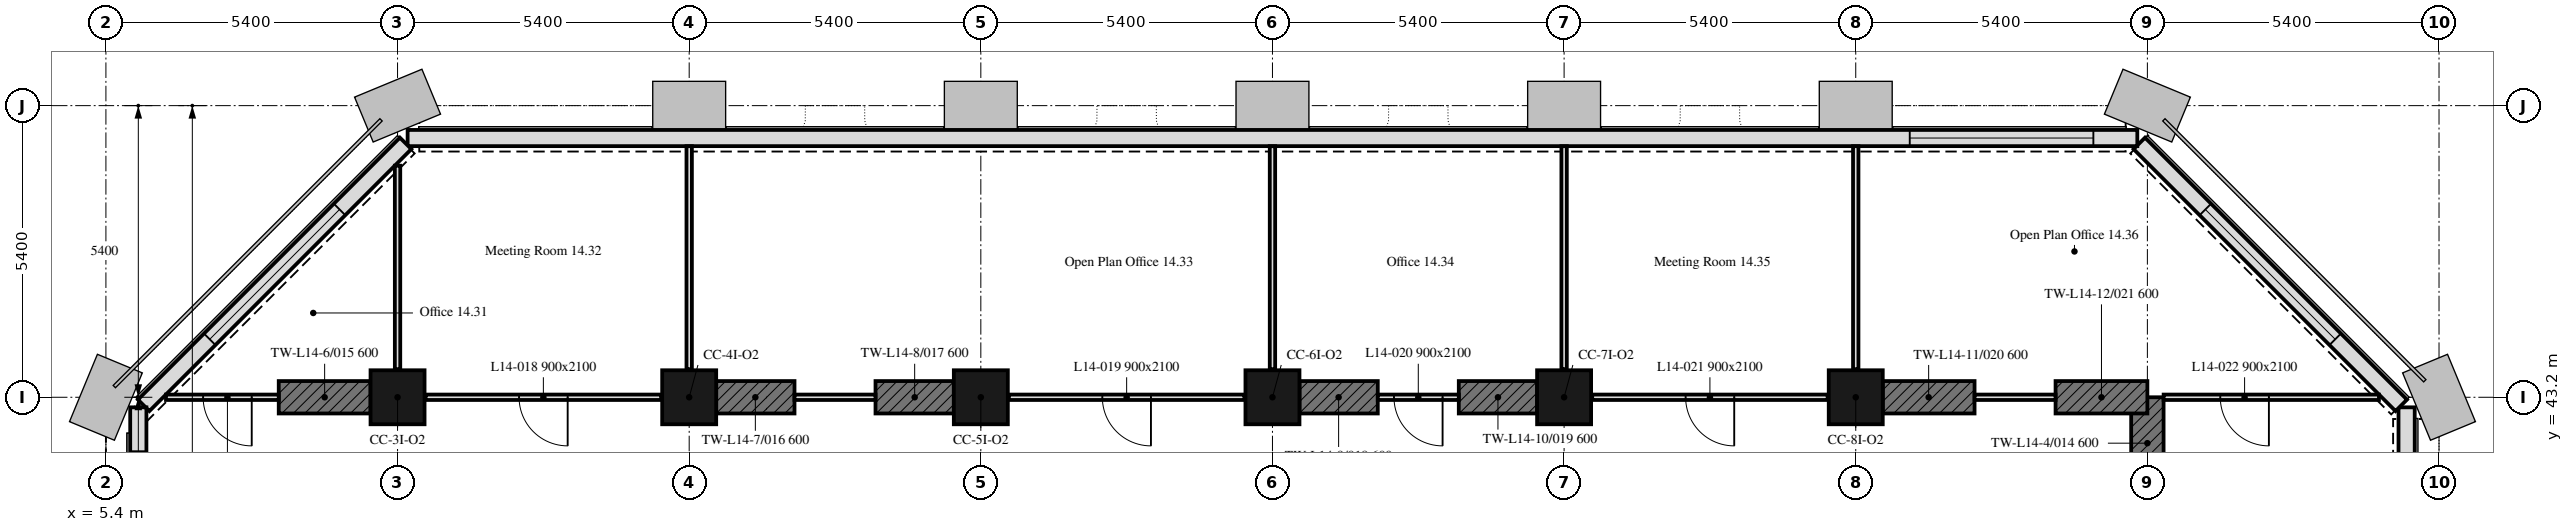
"""IFC4 building model, lengths in metres.
Left out: names, types, materials, properties, quantities, classifications, styles, units other than length and angle.
Written with IfcOpenShell. Run it as: python <this file> out.ifc"""

import sys

from ifc_helpers import new_model, si_unit, direction, frame, frame_2d, origin, origin_2d, place, context, subcontext, project, spatial, rectangle, extrude, element, fill, save


model = new_model("IFC4")
c1 = context("Model", 3, precision=1e-05, world=origin(), true_north=direction((0.0, 1.0)))
c2 = subcontext(c1, "Body", "Model", "MODEL_VIEW")
j1 = project(units=[si_unit("LENGTHUNIT", "METRE"), si_unit("PLANEANGLEUNIT", "RADIAN")], contexts=[c1])
p1 = place(None, origin())
s1 = spatial("IfcSite", under=j1, at=p1, CompositionType="ELEMENT")
p2 = place(p1, origin())
s2 = spatial("IfcBuilding", under=s1, at=p2, CompositionType="ELEMENT")
p3 = place(p2, frame((0.0, 0.0, 65.0)))
s3 = spatial("IfcBuildingStorey", under=s2, at=p3, CompositionType="ELEMENT", Elevation=65.0)
for number, where, z_axis, x_axis in (
    (1, (10.8, 43.2, 0.0), (0.0, 0.0, 1.0), (1.0, 0.0, 0.0)),
    (2, (16.2, 43.2, 0.0), (0.0, 0.0, 1.0), (1.0, 0.0, 0.0)),
    (3, (21.6, 43.2, 0.0), (0.0, 0.0, 1.0), (1.0, 0.0, 0.0)),
    (4, (27.0, 43.2, 0.0), (0.0, 0.0, 1.0), (1.0, 0.0, 0.0)),
    (5, (32.4, 43.2, 0.0), (0.0, 0.0, 1.0), (1.0, 0.0, 0.0)),
    (6, (37.8, 43.2, 0.0), (0.0, 0.0, 1.0), (1.0, 0.0, 0.0)),
):
    element("IfcColumn", number, at=place(p3, frame(where, z_axis=z_axis, x_axis=x_axis)), inside=s3, PredefinedType="COLUMN", context=c2, shape_type="SweptSolid", body=[
        extrude(rectangle(XDim=1.0, YDim=1.0, at=origin_2d()), origin(), (0.0, 0.0, 1.0), 3.5),
    ])
for number, where, z_axis, x_axis in (
    (7, (43.2, 41.5, 0.0), (0.0, 0.0, 1.0), (0.0, 1.0, 0.0)),
    (8, (8.6, 43.2, 0.0), (0.0, 0.0, 1.0), (1.0, 0.0, 0.0)),
):
    element("IfcWall", number, at=place(p3, frame(where, z_axis=z_axis, x_axis=x_axis)), inside=s3, PredefinedType="SHEAR", context=c2, shape_type="SweptSolid", body=[
        extrude(rectangle(XDim=1.7, YDim=0.6, at=frame_2d((0.85, 0.0))), origin(), (0.0, 0.0, 1.0), 3.5),
    ])
p4 = place(p3, frame((16.7, 43.2, 0.0), z_axis=(0.0, 0.0, 1.0), x_axis=(1.0, 0.0, 0.0)))
e9 = element("IfcWall", 9, at=p4, inside=s3, PredefinedType="SHEAR", context=c2, shape_type="SweptSolid", body=[
    extrude(rectangle(XDim=1.45, YDim=0.6, at=frame_2d((0.725, 0.0))), origin(), (0.0, 0.0, 1.0), 3.5),
])
p5 = place(p3, frame((19.65, 43.2, 0.0), z_axis=(0.0, 0.0, 1.0), x_axis=(1.0, 0.0, 0.0)))
e10 = element("IfcWall", 10, at=p5, inside=s3, PredefinedType="SHEAR", context=c2, shape_type="SweptSolid", body=[
    extrude(rectangle(XDim=1.45, YDim=0.6, at=frame_2d((0.725, 0.0))), origin(), (0.0, 0.0, 1.0), 3.5),
])
for number, where, z_axis, x_axis in (
    (11, (27.5, 43.2, 0.0), (0.0, 0.0, 1.0), (1.0, 0.0, 0.0)),
    (12, (30.45, 43.2, 0.0), (0.0, 0.0, 1.0), (1.0, 0.0, 0.0)),
):
    element("IfcWall", number, at=place(p3, frame(where, z_axis=z_axis, x_axis=x_axis)), inside=s3, PredefinedType="SHEAR", context=c2, shape_type="SweptSolid", body=[
        extrude(rectangle(XDim=1.45, YDim=0.6, at=frame_2d((0.725, 0.0))), origin(), (0.0, 0.0, 1.0), 3.5),
    ])
for number, where, z_axis, x_axis in (
    (13, (38.3, 43.2, 0.0), (0.0, 0.0, 1.0), (1.0, 0.0, 0.0)),
    (14, (41.5, 43.2, 0.0), (0.0, 0.0, 1.0), (1.0, 0.0, 0.0)),
):
    element("IfcWall", number, at=place(p3, frame(where, z_axis=z_axis, x_axis=x_axis)), inside=s3, PredefinedType="SHEAR", context=c2, shape_type="SweptSolid", body=[
        extrude(rectangle(XDim=1.7, YDim=0.6, at=frame_2d((0.85, 0.0))), origin(), (0.0, 0.0, 1.0), 3.5),
    ])
p6 = place(p3, frame((48.0, 10.986, 0.0), z_axis=(0.0, 0.0, 1.0), x_axis=(0.0, 1.0, 0.0)))
e15 = element("IfcWall", 15, at=p6, inside=s3, PredefinedType="SOLIDWALL", context=c2, shape_type="SweptSolid", body=[
    extrude(rectangle(XDim=32.027, YDim=0.3, at=frame_2d((16.014, 0.0))), origin(), (0.0, 0.0, 1.0), 3.5),
])
p7 = place(p6, frame((1.164, 0.0, 0.9)))
e16 = element("IfcOpeningElement", 16, at=p7, cuts=e15, PredefinedType="OPENING", context=c2, shape_type="SweptSolid", body=[
    extrude(rectangle(XDim=1.1, YDim=1.7, at=frame_2d((0.55, 0.85))), frame((0.0, 0.16, 0.0), z_axis=(0.0, -1.0, 0.0), x_axis=(1.0, 0.0, 0.0)), (0.0, 0.0, 1.0), 0.32),
])
p8 = place(p6, frame((2.764, 0.0, 0.9)))
e17 = element("IfcOpeningElement", 17, at=p8, cuts=e15, PredefinedType="OPENING", context=c2, shape_type="SweptSolid", body=[
    extrude(rectangle(XDim=1.1, YDim=1.7, at=frame_2d((0.55, 0.85))), frame((0.0, 0.16, 0.0), z_axis=(0.0, -1.0, 0.0), x_axis=(1.0, 0.0, 0.0)), (0.0, 0.0, 1.0), 0.32),
])
p9 = place(p3, frame((47.901, 43.051, 0.0), z_axis=(0.0, 0.0, 1.0), x_axis=(-0.707106781187, 0.707106781187, 0.0)))
e18 = element("IfcWall", 18, at=p9, inside=s3, PredefinedType="SOLIDWALL", context=c2, shape_type="SweptSolid", body=[
    extrude(rectangle(XDim=6.86, YDim=0.3, at=frame_2d((3.43, 0.0))), origin(), (0.0, 0.0, 1.0), 3.5),
])
p10 = place(p9, frame((1.73, 0.0, 0.9)))
e19 = element("IfcOpeningElement", 19, at=p10, cuts=e18, PredefinedType="OPENING", context=c2, shape_type="SweptSolid", body=[
    extrude(rectangle(XDim=3.4, YDim=1.7, at=frame_2d((1.7, 0.85))), frame((0.0, 0.16, 0.0), z_axis=(0.0, -1.0, 0.0), x_axis=(1.0, 0.0, 0.0)), (0.0, 0.0, 1.0), 0.32),
])
p11 = place(p3, frame((43.014, 48.0, 0.0), z_axis=(0.0, 0.0, 1.0), x_axis=(-1.0, 0.0, 0.0)))
e20 = element("IfcWall", 20, at=p11, inside=s3, PredefinedType="SOLIDWALL", context=c2, shape_type="SweptSolid", body=[
    extrude(rectangle(XDim=32.027, YDim=0.3, at=frame_2d((16.014, 0.0))), origin(), (0.0, 0.0, 1.0), 3.5),
])
p12 = place(p11, frame((0.814, 0.0, 0.9)))
e21 = element("IfcOpeningElement", 21, at=p12, cuts=e20, PredefinedType="OPENING", context=c2, shape_type="SweptSolid", body=[
    extrude(rectangle(XDim=3.4, YDim=1.7, at=frame_2d((1.7, 0.85))), frame((0.0, 0.16, 0.0), z_axis=(0.0, -1.0, 0.0), x_axis=(1.0, 0.0, 0.0)), (0.0, 0.0, 1.0), 0.32),
])
p13 = place(p3, frame((10.949, 47.901, 0.0), z_axis=(0.0, 0.0, 1.0), x_axis=(-0.707106781187, -0.707106781187, 0.0)))
e22 = element("IfcWall", 22, at=p13, inside=s3, PredefinedType="SOLIDWALL", context=c2, shape_type="SweptSolid", body=[
    extrude(rectangle(XDim=6.86, YDim=0.3, at=frame_2d((3.43, 0.0))), origin(), (0.0, 0.0, 1.0), 3.5),
])
p14 = place(p13, frame((1.73, 0.0, 0.9)))
e23 = element("IfcOpeningElement", 23, at=p14, cuts=e22, PredefinedType="OPENING", context=c2, shape_type="SweptSolid", body=[
    extrude(rectangle(XDim=3.4, YDim=1.7, at=frame_2d((1.7, 0.85))), frame((0.0, 0.16, 0.0), z_axis=(0.0, -1.0, 0.0), x_axis=(1.0, 0.0, 0.0)), (0.0, 0.0, 1.0), 0.32),
])
p15 = place(p3, frame((6.0, 43.014, 0.0), z_axis=(0.0, 0.0, 1.0), x_axis=(0.0, -1.0, 0.0)))
e24 = element("IfcWall", 24, at=p15, inside=s3, PredefinedType="SOLIDWALL", context=c2, shape_type="SweptSolid", body=[
    extrude(rectangle(XDim=10.614, YDim=0.3, at=frame_2d((5.307, 0.0))), origin(), (0.0, 0.0, 1.0), 3.5),
])
p16 = place(p15, frame((0.814, 0.0, 0.9)))
e25 = element("IfcOpeningElement", 25, at=p16, cuts=e24, PredefinedType="OPENING", context=c2, shape_type="SweptSolid", body=[
    extrude(rectangle(XDim=3.4, YDim=1.7, at=frame_2d((1.7, 0.85))), frame((0.0, 0.16, 0.0), z_axis=(0.0, -1.0, 0.0), x_axis=(1.0, 0.0, 0.0)), (0.0, 0.0, 1.0), 0.32),
])
p17 = place(p3, frame((47.488, 43.2, 0.0), z_axis=(0.0, 0.0, 1.0), x_axis=(-1.0, 0.0, 0.0)))
e26 = element("IfcWall", 26, at=p17, inside=s3, PredefinedType="PARTITIONING", context=c2, shape_type="SweptSolid", body=[
    extrude(rectangle(XDim=3.987, YDim=0.1, at=frame_2d((1.993, 0.0))), origin(), (0.0, 0.0, 1.0), 3.5),
])
p18 = place(p17, frame((2.038, 0.0, 0.0)))
e27 = element("IfcOpeningElement", 27, at=p18, cuts=e26, PredefinedType="OPENING", context=c2, shape_type="SweptSolid", body=[
    extrude(rectangle(XDim=0.9, YDim=2.1, at=frame_2d((0.45, 1.05))), frame((0.0, 0.05, 0.0), z_axis=(0.0, -1.0, 0.0), x_axis=(1.0, 0.0, 0.0)), (0.0, 0.0, 1.0), 0.1),
])
p19 = place(p3, frame((41.5, 43.2, 0.0), z_axis=(0.0, 0.0, 1.0), x_axis=(-1.0, 0.0, 0.0)))
e28 = element("IfcWall", 28, at=p19, inside=s3, PredefinedType="PARTITIONING", context=c2, shape_type="SweptSolid", body=[
    extrude(rectangle(XDim=1.5, YDim=0.1, at=frame_2d((0.75, 0.0))), origin(), (0.0, 0.0, 1.0), 3.5),
])
p20 = place(p3, frame((37.28, 43.2, 0.0), z_axis=(0.0, 0.0, 1.0), x_axis=(-1.0, 0.0, 0.0)))
e29 = element("IfcWall", 29, at=p20, inside=s3, PredefinedType="PARTITIONING", context=c2, shape_type="SweptSolid", body=[
    extrude(rectangle(XDim=4.36, YDim=0.1, at=frame_2d((2.18, 0.0))), origin(), (0.0, 0.0, 1.0), 3.5),
])
p21 = place(p20, frame((1.73, 0.0, 0.0)))
e30 = element("IfcOpeningElement", 30, at=p21, cuts=e29, PredefinedType="OPENING", context=c2, shape_type="SweptSolid", body=[
    extrude(rectangle(XDim=0.9, YDim=2.1, at=frame_2d((0.45, 1.05))), frame((0.0, 0.05, 0.0), z_axis=(0.0, -1.0, 0.0), x_axis=(1.0, 0.0, 0.0)), (0.0, 0.0, 1.0), 0.1),
])
p22 = place(p3, frame((30.45, 43.2, 0.0), z_axis=(0.0, 0.0, 1.0), x_axis=(-1.0, 0.0, 0.0)))
e31 = element("IfcWall", 31, at=p22, inside=s3, PredefinedType="PARTITIONING", context=c2, shape_type="SweptSolid", body=[
    extrude(rectangle(XDim=1.5, YDim=0.1, at=frame_2d((0.75, 0.0))), origin(), (0.0, 0.0, 1.0), 3.5),
])
p23 = place(p22, frame((0.3, 0.0, 0.0)))
e32 = element("IfcOpeningElement", 32, at=p23, cuts=e31, PredefinedType="OPENING", context=c2, shape_type="SweptSolid", body=[
    extrude(rectangle(XDim=0.9, YDim=2.1, at=frame_2d((0.45, 1.05))), frame((0.0, 0.05, 0.0), z_axis=(0.0, -1.0, 0.0), x_axis=(1.0, 0.0, 0.0)), (0.0, 0.0, 1.0), 0.1),
])
p24 = place(p3, frame((26.48, 43.2, 0.0), z_axis=(0.0, 0.0, 1.0), x_axis=(-1.0, 0.0, 0.0)))
e33 = element("IfcWall", 33, at=p24, inside=s3, PredefinedType="PARTITIONING", context=c2, shape_type="SweptSolid", body=[
    extrude(rectangle(XDim=4.36, YDim=0.1, at=frame_2d((2.18, 0.0))), origin(), (0.0, 0.0, 1.0), 3.5),
])
p25 = place(p24, frame((1.73, 0.0, 0.0)))
e34 = element("IfcOpeningElement", 34, at=p25, cuts=e33, PredefinedType="OPENING", context=c2, shape_type="SweptSolid", body=[
    extrude(rectangle(XDim=0.9, YDim=2.1, at=frame_2d((0.45, 1.05))), frame((0.0, 0.05, 0.0), z_axis=(0.0, -1.0, 0.0), x_axis=(1.0, 0.0, 0.0)), (0.0, 0.0, 1.0), 0.1),
])
p26 = place(p3, frame((19.65, 43.2, 0.0), z_axis=(0.0, 0.0, 1.0), x_axis=(-1.0, 0.0, 0.0)))
e35 = element("IfcWall", 35, at=p26, inside=s3, PredefinedType="PARTITIONING", context=c2, shape_type="SweptSolid", body=[
    extrude(rectangle(XDim=1.5, YDim=0.1, at=frame_2d((0.75, 0.0))), origin(), (0.0, 0.0, 1.0), 3.5),
])
p27 = place(p3, frame((15.68, 43.2, 0.0), z_axis=(0.0, 0.0, 1.0), x_axis=(-1.0, 0.0, 0.0)))
e36 = element("IfcWall", 36, at=p27, inside=s3, PredefinedType="PARTITIONING", context=c2, shape_type="SweptSolid", body=[
    extrude(rectangle(XDim=4.36, YDim=0.1, at=frame_2d((2.18, 0.0))), origin(), (0.0, 0.0, 1.0), 3.5),
])
p28 = place(p27, frame((1.73, 0.0, 0.0)))
e37 = element("IfcOpeningElement", 37, at=p28, cuts=e36, PredefinedType="OPENING", context=c2, shape_type="SweptSolid", body=[
    extrude(rectangle(XDim=0.9, YDim=2.1, at=frame_2d((0.45, 1.05))), frame((0.0, 0.05, 0.0), z_axis=(0.0, -1.0, 0.0), x_axis=(1.0, 0.0, 0.0)), (0.0, 0.0, 1.0), 0.1),
])
p29 = place(p3, frame((8.6, 43.2, 0.0), z_axis=(0.0, 0.0, 1.0), x_axis=(-1.0, 0.0, 0.0)))
e38 = element("IfcWall", 38, at=p29, inside=s3, PredefinedType="PARTITIONING", context=c2, shape_type="SweptSolid", body=[
    extrude(rectangle(XDim=2.088, YDim=0.1, at=frame_2d((1.044, 0.0))), origin(), (0.0, 0.0, 1.0), 3.5),
])
p30 = place(p29, frame((0.5, 0.0, 0.0)))
e39 = element("IfcOpeningElement", 39, at=p30, cuts=e38, PredefinedType="OPENING", context=c2, shape_type="SweptSolid", body=[
    extrude(rectangle(XDim=0.9, YDim=2.1, at=frame_2d((0.45, 1.05))), frame((0.0, 0.05, 0.0), z_axis=(0.0, -1.0, 0.0), x_axis=(1.0, 0.0, 0.0)), (0.0, 0.0, 1.0), 0.1),
])
p31 = place(p3, frame((10.8, 43.72, 0.0), z_axis=(0.0, 0.0, 1.0), x_axis=(0.0, 1.0, 0.0)))
e40 = element("IfcWall", 40, at=p31, inside=s3, PredefinedType="PARTITIONING", context=c2, shape_type="SweptSolid", body=[
    extrude(rectangle(XDim=3.768, YDim=0.1, at=frame_2d((1.884, 0.0))), origin(), (0.0, 0.0, 1.0), 3.5),
])
for number, where, z_axis, x_axis in (
    (41, (16.2, 43.72, 0.0), (0.0, 0.0, 1.0), (0.0, 1.0, 0.0)),
    (42, (27.0, 47.849, 0.0), (0.0, 0.0, 1.0), (0.0, -1.0, 0.0)),
    (43, (32.4, 47.849, 0.0), (0.0, 0.0, 1.0), (0.0, -1.0, 0.0)),
    (44, (37.8, 47.849, 0.0), (0.0, 0.0, 1.0), (0.0, -1.0, 0.0)),
):
    element("IfcWall", number, at=place(p3, frame(where, z_axis=z_axis, x_axis=x_axis)), inside=s3, PredefinedType="PARTITIONING", context=c2, shape_type="SweptSolid", body=[
        extrude(rectangle(XDim=4.129, YDim=0.1, at=frame_2d((2.064, 0.0))), origin(), (0.0, 0.0, 1.0), 2.75),
    ])
p32 = place(p10, origin())
e45 = element("IfcWindow", 45, at=p32, inside=s3, PartitioningType="SINGLE_PANEL", PredefinedType="WINDOW", context=c2, shape_type="SweptSolid", body=[
    extrude(rectangle(XDim=3.4, YDim=1.7, at=frame_2d((1.7, 0.85))), frame((0.0, 0.03, 0.0), z_axis=(0.0, -1.0, 0.0), x_axis=(1.0, 0.0, 0.0)), (0.0, 0.0, 1.0), 0.06),
])
fill(e19, e45)
p33 = place(p12, origin())
e46 = element("IfcWindow", 46, at=p33, inside=s3, PartitioningType="SINGLE_PANEL", PredefinedType="WINDOW", context=c2, shape_type="SweptSolid", body=[
    extrude(rectangle(XDim=3.4, YDim=1.7, at=frame_2d((1.7, 0.85))), frame((0.0, 0.03, 0.0), z_axis=(0.0, -1.0, 0.0), x_axis=(1.0, 0.0, 0.0)), (0.0, 0.0, 1.0), 0.06),
])
fill(e21, e46)
p34 = place(p14, origin())
e47 = element("IfcWindow", 47, at=p34, inside=s3, PartitioningType="SINGLE_PANEL", PredefinedType="WINDOW", context=c2, shape_type="SweptSolid", body=[
    extrude(rectangle(XDim=3.4, YDim=1.7, at=frame_2d((1.7, 0.85))), frame((0.0, 0.03, 0.0), z_axis=(0.0, -1.0, 0.0), x_axis=(1.0, 0.0, 0.0)), (0.0, 0.0, 1.0), 0.06),
])
fill(e23, e47)
p35 = place(p30, origin())
e48 = element("IfcDoor", 48, at=p35, inside=s3, OperationType="SINGLE_SWING_RIGHT", PredefinedType="DOOR", context=c2, shape_type="SweptSolid", body=[
    extrude(rectangle(XDim=0.9, YDim=2.1, at=frame_2d((0.45, 1.05))), frame((0.0, 0.025, 0.0), z_axis=(0.0, -1.0, 0.0), x_axis=(1.0, 0.0, 0.0)), (0.0, 0.0, 1.0), 0.05),
])
fill(e39, e48)
p36 = place(p28, origin())
e49 = element("IfcDoor", 49, at=p36, inside=s3, OperationType="SINGLE_SWING_RIGHT", PredefinedType="DOOR", context=c2, shape_type="SweptSolid", body=[
    extrude(rectangle(XDim=0.9, YDim=2.1, at=frame_2d((0.45, 1.05))), frame((0.0, 0.025, 0.0), z_axis=(0.0, -1.0, 0.0), x_axis=(1.0, 0.0, 0.0)), (0.0, 0.0, 1.0), 0.05),
])
fill(e37, e49)
p37 = place(p25, origin())
e50 = element("IfcDoor", 50, at=p37, inside=s3, OperationType="SINGLE_SWING_RIGHT", PredefinedType="DOOR", context=c2, shape_type="SweptSolid", body=[
    extrude(rectangle(XDim=0.9, YDim=2.1, at=frame_2d((0.45, 1.05))), frame((0.0, 0.025, 0.0), z_axis=(0.0, -1.0, 0.0), x_axis=(1.0, 0.0, 0.0)), (0.0, 0.0, 1.0), 0.05),
])
fill(e34, e50)
p38 = place(p23, origin())
e51 = element("IfcDoor", 51, at=p38, inside=s3, OperationType="SINGLE_SWING_RIGHT", PredefinedType="DOOR", context=c2, shape_type="SweptSolid", body=[
    extrude(rectangle(XDim=0.9, YDim=2.1, at=frame_2d((0.45, 1.05))), frame((0.0, 0.025, 0.0), z_axis=(0.0, -1.0, 0.0), x_axis=(1.0, 0.0, 0.0)), (0.0, 0.0, 1.0), 0.05),
])
fill(e32, e51)
p39 = place(p21, origin())
e52 = element("IfcDoor", 52, at=p39, inside=s3, OperationType="SINGLE_SWING_LEFT", PredefinedType="DOOR", context=c2, shape_type="SweptSolid", body=[
    extrude(rectangle(XDim=0.9, YDim=2.1, at=frame_2d((0.45, 1.05))), frame((0.0, 0.025, 0.0), z_axis=(0.0, -1.0, 0.0), x_axis=(1.0, 0.0, 0.0)), (0.0, 0.0, 1.0), 0.05),
])
fill(e30, e52)
p40 = place(p18, origin())
e53 = element("IfcDoor", 53, at=p40, inside=s3, OperationType="SINGLE_SWING_LEFT", PredefinedType="DOOR", context=c2, shape_type="SweptSolid", body=[
    extrude(rectangle(XDim=0.9, YDim=2.1, at=frame_2d((0.45, 1.05))), frame((0.0, 0.025, 0.0), z_axis=(0.0, -1.0, 0.0), x_axis=(1.0, 0.0, 0.0)), (0.0, 0.0, 1.0), 0.05),
])
fill(e27, e53)
save(model, sys.argv[1])
